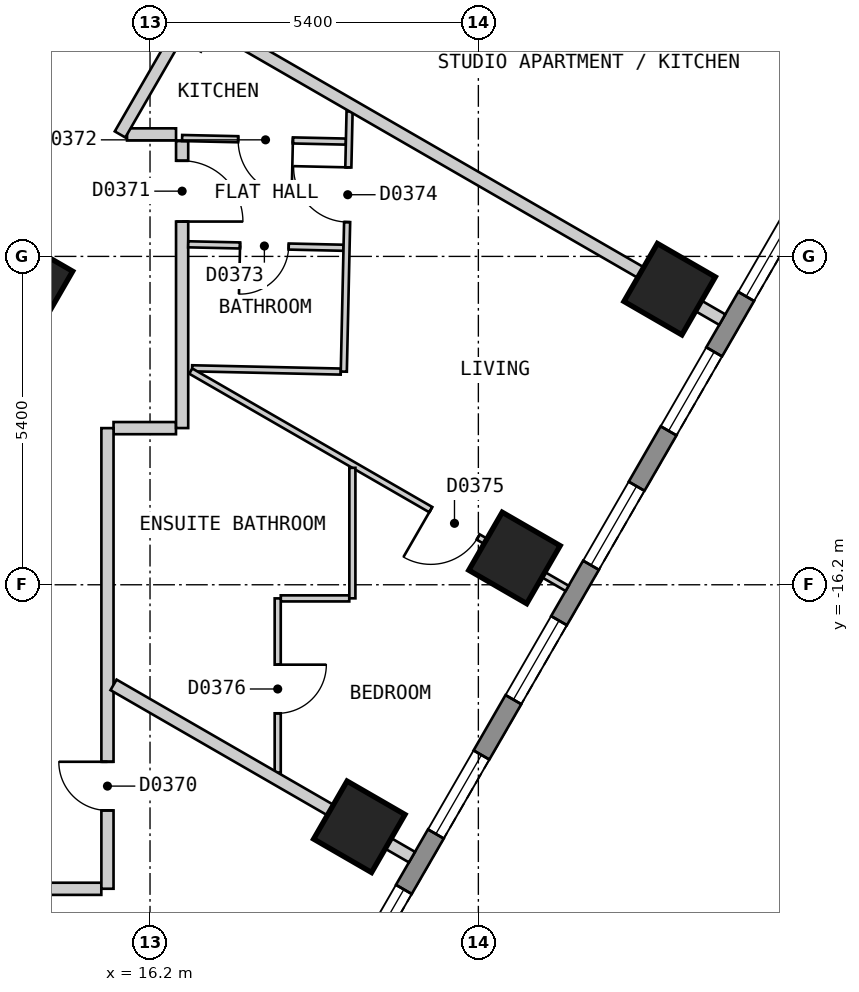
"""IFC4 building model, lengths in metres.
Left out: names, types, materials, properties, quantities, classifications, styles, units other than length and angle.
Written with IfcOpenShell. Run it as: python <this file> out.ifc"""

import sys

from ifc_helpers import new_model, si_unit, direction, frame, frame_2d, origin, origin_2d, place, context, subcontext, project, spatial, polyline, rectangle, outline, extrude, element, fill, save


model = new_model("IFC4")
c1 = context("Model", 3, precision=1e-05, world=origin(), true_north=direction((0.0, 1.0)))
c2 = subcontext(c1, "Body", "Model", "MODEL_VIEW")
j1 = project(units=[si_unit("LENGTHUNIT", "METRE"), si_unit("PLANEANGLEUNIT", "RADIAN")], contexts=[c1])
p1 = place(None, origin())
s1 = spatial("IfcSite", under=j1, at=p1, CompositionType="ELEMENT")
p2 = place(p1, origin())
s2 = spatial("IfcBuilding", under=s1, at=p2, CompositionType="ELEMENT")
p3 = place(p2, frame((0.0, 0.0, 59.4)))
s3 = spatial("IfcBuildingStorey", under=s2, at=p3, CompositionType="ELEMENT", Elevation=59.4)
for number, where, z_axis, x_axis in (
    (1, (19.642, -20.18, 0.0), (0.0, 0.0, 1.0), (0.5, 0.866, 0.0)),
    (2, (22.194, -15.759, 0.0), (0.0, 0.0, 1.0), (0.5, 0.866, 0.0)),
    (3, (24.746, -11.339, 0.0), (0.0, 0.0, 1.0), (0.5, 0.866, 0.0)),
    (4, (27.298, -6.919, 0.0), (0.0, 0.0, 1.0), (0.5, 0.866, 0.0)),
):
    element("IfcColumn", number, at=place(p3, frame(where, z_axis=z_axis, x_axis=x_axis)), inside=s3, PredefinedType="COLUMN", context=c2, shape_type="SweptSolid", body=[
        extrude(rectangle(XDim=1.1, YDim=1.1, at=origin_2d()), origin(), (0.0, 0.0, 1.0), 3.0),
    ])
p4 = place(p3, frame((14.313, -11.209, 0.0), z_axis=(0.0, 0.0, 1.0), x_axis=(0.499984884929, 0.866034130299, 0.0)))
e5 = element("IfcColumn", 5, at=p4, inside=s3, PredefinedType="COLUMN", context=c2, shape_type="SweptSolid", body=[
    extrude(rectangle(XDim=0.9, YDim=0.9, at=origin_2d()), origin(), (0.0, 0.0, 1.0), 3.0),
])
p5 = place(p3, frame((17.71, -25.825, 0.0), z_axis=(0.0, 0.0, 1.0), x_axis=(0.500001938803, 0.866024284413, 0.0)))
e6 = element("IfcWall", 6, at=p5, inside=s3, PredefinedType="SOLIDWALL", context=c2, shape_type="SweptSolid", body=[
    extrude(outline(polyline([(0.0, -0.15), (27.02, -0.15), (26.94, 0.15), (0.08, 0.15), (0.0, -0.15)])), origin(), (0.0, 0.0, 1.0), 2.6),
])
p6 = place(p5, frame((1.277, 0.0, 0.15)))
e7 = element("IfcOpeningElement", 7, at=p6, cuts=e6, PredefinedType="OPENING", context=c2, shape_type="SweptSolid", body=[
    extrude(rectangle(XDim=1.5, YDim=2.1, at=frame_2d((0.75, 1.05))), frame((0.0, 0.16, 0.0), z_axis=(0.0, -1.0, 0.0), x_axis=(1.0, 0.0, 0.0)), (0.0, 0.0, 1.0), 0.32),
])
p7 = place(p5, frame((3.829, 0.0, 0.15)))
e8 = element("IfcOpeningElement", 8, at=p7, cuts=e6, PredefinedType="OPENING", context=c2, shape_type="SweptSolid", body=[
    extrude(rectangle(XDim=1.5, YDim=2.1, at=frame_2d((0.75, 1.05))), frame((0.0, 0.16, 0.0), z_axis=(0.0, -1.0, 0.0), x_axis=(1.0, 0.0, 0.0)), (0.0, 0.0, 1.0), 0.32),
])
p8 = place(p5, frame((6.382, 0.0, 0.15)))
e9 = element("IfcOpeningElement", 9, at=p8, cuts=e6, PredefinedType="OPENING", context=c2, shape_type="SweptSolid", body=[
    extrude(rectangle(XDim=1.5, YDim=2.1, at=frame_2d((0.75, 1.05))), frame((0.0, 0.16, 0.0), z_axis=(0.0, -1.0, 0.0), x_axis=(1.0, 0.0, 0.0)), (0.0, 0.0, 1.0), 0.32),
])
p9 = place(p5, frame((8.933, 0.0, 0.15)))
e10 = element("IfcOpeningElement", 10, at=p9, cuts=e6, PredefinedType="OPENING", context=c2, shape_type="SweptSolid", body=[
    extrude(rectangle(XDim=1.5, YDim=2.1, at=frame_2d((0.75, 1.05))), frame((0.0, 0.16, 0.0), z_axis=(0.0, -1.0, 0.0), x_axis=(1.0, 0.0, 0.0)), (0.0, 0.0, 1.0), 0.32),
])
p10 = place(p5, frame((11.485, 0.0, 0.15)))
e11 = element("IfcOpeningElement", 11, at=p10, cuts=e6, PredefinedType="OPENING", context=c2, shape_type="SweptSolid", body=[
    extrude(rectangle(XDim=1.5, YDim=2.1, at=frame_2d((0.75, 1.05))), frame((0.0, 0.16, 0.0), z_axis=(0.0, -1.0, 0.0), x_axis=(1.0, 0.0, 0.0)), (0.0, 0.0, 1.0), 0.32),
])
p11 = place(p5, frame((14.037, 0.0, 0.15)))
e12 = element("IfcOpeningElement", 12, at=p11, cuts=e6, PredefinedType="OPENING", context=c2, shape_type="SweptSolid", body=[
    extrude(rectangle(XDim=1.5, YDim=2.1, at=frame_2d((0.75, 1.05))), frame((0.0, 0.16, 0.0), z_axis=(0.0, -1.0, 0.0), x_axis=(1.0, 0.0, 0.0)), (0.0, 0.0, 1.0), 0.32),
])
p12 = place(p5, frame((16.589, 0.0, 0.15)))
e13 = element("IfcOpeningElement", 13, at=p12, cuts=e6, PredefinedType="OPENING", context=c2, shape_type="SweptSolid", body=[
    extrude(rectangle(XDim=1.5, YDim=2.1, at=frame_2d((0.75, 1.05))), frame((0.0, 0.16, 0.0), z_axis=(0.0, -1.0, 0.0), x_axis=(1.0, 0.0, 0.0)), (0.0, 0.0, 1.0), 0.32),
])
p13 = place(p5, frame((19.141, 0.0, 0.15)))
e14 = element("IfcOpeningElement", 14, at=p13, cuts=e6, PredefinedType="OPENING", context=c2, shape_type="SweptSolid", body=[
    extrude(rectangle(XDim=1.5, YDim=2.1, at=frame_2d((0.75, 1.05))), frame((0.0, 0.16, 0.0), z_axis=(0.0, -1.0, 0.0), x_axis=(1.0, 0.0, 0.0)), (0.0, 0.0, 1.0), 0.32),
])
p14 = place(p5, frame((21.693, 0.0, 0.15)))
e15 = element("IfcOpeningElement", 15, at=p14, cuts=e6, PredefinedType="OPENING", context=c2, shape_type="SweptSolid", body=[
    extrude(rectangle(XDim=1.5, YDim=2.1, at=frame_2d((0.75, 1.05))), frame((0.0, 0.16, 0.0), z_axis=(0.0, -1.0, 0.0), x_axis=(1.0, 0.0, 0.0)), (0.0, 0.0, 1.0), 0.32),
])
p15 = place(p5, frame((24.244, 0.0, 0.15)))
e16 = element("IfcOpeningElement", 16, at=p15, cuts=e6, PredefinedType="OPENING", context=c2, shape_type="SweptSolid", body=[
    extrude(rectangle(XDim=1.5, YDim=2.1, at=frame_2d((0.75, 1.05))), frame((0.0, 0.16, 0.0), z_axis=(0.0, -1.0, 0.0), x_axis=(1.0, 0.0, 0.0)), (0.0, 0.0, 1.0), 0.32),
])
p16 = place(p3, frame((15.822, -8.794, 0.0), z_axis=(0.0, 0.0, 1.0), x_axis=(1.0, 0.0, 0.0)))
e17 = element("IfcWall", 17, at=p16, inside=s3, PredefinedType="PARTITIONING", context=c2, shape_type="SweptSolid", body=[
    extrude(rectangle(XDim=0.806, YDim=0.2, at=frame_2d((0.403, 0.0))), origin(), (0.0, 0.0, 1.0), 2.6),
])
p17 = place(p3, frame((15.6, -13.624, 0.0), z_axis=(0.0, 0.0, 1.0), x_axis=(1.0, 0.0, 0.0)))
e18 = element("IfcWall", 18, at=p17, inside=s3, PredefinedType="PARTITIONING", context=c2, shape_type="SweptSolid", body=[
    extrude(rectangle(XDim=1.027, YDim=0.2, at=frame_2d((0.513, 0.0))), origin(), (0.0, 0.0, 1.0), 2.6),
])
p18 = place(p3, frame((-15.4, -21.2, 0.0), z_axis=(0.0, 0.0, 1.0), x_axis=(1.0, 0.0, 0.0)))
e19 = element("IfcWall", 19, at=p18, inside=s3, PredefinedType="PARTITIONING", context=c2, shape_type="SweptSolid", body=[
    extrude(rectangle(XDim=30.799, YDim=0.2, at=frame_2d((15.399, 0.0))), origin(), (0.0, 0.0, 1.0), 2.6),
])
p19 = place(p18, frame((9.797, 0.0, 0.0)))
e20 = element("IfcOpeningElement", 20, at=p19, cuts=e19, PredefinedType="OPENING", context=c2, shape_type="SweptSolid", body=[
    extrude(rectangle(XDim=1.0, YDim=2.1, at=frame_2d((0.5, 1.05))), frame((0.0, 0.11, 0.0), z_axis=(0.0, -1.0, 0.0), x_axis=(1.0, 0.0, 0.0)), (0.0, 0.0, 1.0), 0.22),
])
p20 = place(p18, frame((14.901, 0.0, 0.0)))
e21 = element("IfcOpeningElement", 21, at=p20, cuts=e19, PredefinedType="OPENING", context=c2, shape_type="SweptSolid", body=[
    extrude(rectangle(XDim=1.0, YDim=2.1, at=frame_2d((0.5, 1.05))), frame((0.0, 0.11, 0.0), z_axis=(0.0, -1.0, 0.0), x_axis=(1.0, 0.0, 0.0)), (0.0, 0.0, 1.0), 0.22),
])
p21 = place(p18, frame((24.916, 0.0, 0.0)))
e22 = element("IfcOpeningElement", 22, at=p21, cuts=e19, PredefinedType="OPENING", context=c2, shape_type="SweptSolid", body=[
    extrude(rectangle(XDim=0.9, YDim=2.1, at=frame_2d((0.45, 1.05))), frame((0.0, 0.11, 0.0), z_axis=(0.0, -1.0, 0.0), x_axis=(1.0, 0.0, 0.0)), (0.0, 0.0, 1.0), 0.22),
])
p22 = place(p3, frame((15.707, -8.794, 0.0), z_axis=(0.0, 0.0, 1.0), x_axis=(0.500040469623, 0.866002037376, 0.0)))
e23 = element("IfcWall", 23, at=p22, inside=s3, PredefinedType="PARTITIONING", context=c2, shape_type="SweptSolid", body=[
    extrude(rectangle(XDim=2.281, YDim=0.2, at=frame_2d((1.141, 0.0))), origin(), (0.0, 0.0, 1.0), 2.6),
])
p23 = place(p3, frame((15.5, -21.199, 0.0), z_axis=(0.0, 0.0, 1.0), x_axis=(0.0, 1.0, 0.0)))
e24 = element("IfcWall", 24, at=p23, inside=s3, PredefinedType="PARTITIONING", context=c2, shape_type="SweptSolid", body=[
    extrude(rectangle(XDim=7.575, YDim=0.2, at=frame_2d((3.788, 0.0))), origin(), (0.0, 0.0, 1.0), 2.6),
])
p24 = place(p23, frame((1.288, 0.0, 0.0)))
e25 = element("IfcOpeningElement", 25, at=p24, cuts=e24, PredefinedType="OPENING", context=c2, shape_type="SweptSolid", body=[
    extrude(rectangle(XDim=0.8, YDim=2.1, at=frame_2d((0.4, 1.05))), frame((0.0, 0.11, 0.0), z_axis=(0.0, -1.0, 0.0), x_axis=(1.0, 0.0, 0.0)), (0.0, 0.0, 1.0), 0.22),
])
p25 = place(p3, frame((16.728, -13.623, 0.0), z_axis=(0.0, 0.0, 1.0), x_axis=(0.0, 1.0, 0.0)))
e26 = element("IfcWall", 26, at=p25, inside=s3, PredefinedType="PARTITIONING", context=c2, shape_type="SweptSolid", body=[
    extrude(rectangle(XDim=4.72, YDim=0.2, at=frame_2d((2.36, 0.0))), origin(), (0.0, 0.0, 1.0), 2.6),
])
p26 = place(p25, frame((3.396, 0.0, 0.0)))
e27 = element("IfcOpeningElement", 27, at=p26, cuts=e26, PredefinedType="OPENING", context=c2, shape_type="SweptSolid", body=[
    extrude(rectangle(XDim=1.0, YDim=2.1, at=frame_2d((0.5, 1.05))), frame((0.0, 0.11, 0.0), z_axis=(0.0, -1.0, 0.0), x_axis=(1.0, 0.0, 0.0)), (0.0, 0.0, 1.0), 0.22),
])
p27 = place(p3, frame((16.728, -8.853, 0.0), z_axis=(0.0, 0.0, 1.0), x_axis=(0.999759401479, -0.02193488442, 0.0)))
e28 = element("IfcWall", 28, at=p27, inside=s3, PredefinedType="PARTITIONING", context=c2, shape_type="SweptSolid", body=[
    extrude(rectangle(XDim=2.694, YDim=0.1, at=frame_2d((1.347, 0.0))), origin(), (0.0, 0.0, 1.0), 2.6),
])
p28 = place(p27, frame((0.922, 0.0, 0.0)))
e29 = element("IfcOpeningElement", 29, at=p28, cuts=e28, PredefinedType="OPENING", context=c2, shape_type="SweptSolid", body=[
    extrude(rectangle(XDim=0.9, YDim=2.1, at=frame_2d((0.45, 1.05))), frame((0.0, 0.06, 0.0), z_axis=(0.0, -1.0, 0.0), x_axis=(1.0, 0.0, 0.0)), (0.0, 0.0, 1.0), 0.12),
])
p29 = place(p3, frame((16.828, -10.601, 0.0), z_axis=(0.0, 0.0, 1.0), x_axis=(0.999752091799, -0.022265555094, 0.0)))
e30 = element("IfcWall", 30, at=p29, inside=s3, PredefinedType="PARTITIONING", context=c2, shape_type="SweptSolid", body=[
    extrude(rectangle(XDim=2.555, YDim=0.1, at=frame_2d((1.277, 0.0))), origin(), (0.0, 0.0, 1.0), 2.6),
])
p30 = place(p29, frame((0.853, 0.0, 0.0)))
e31 = element("IfcOpeningElement", 31, at=p30, cuts=e30, PredefinedType="OPENING", context=c2, shape_type="SweptSolid", body=[
    extrude(rectangle(XDim=0.8, YDim=2.1, at=frame_2d((0.4, 1.05))), frame((0.0, 0.06, 0.0), z_axis=(0.0, -1.0, 0.0), x_axis=(1.0, 0.0, 0.0)), (0.0, 0.0, 1.0), 0.12),
])
p31 = place(p3, frame((16.892, -12.64, 0.0), z_axis=(0.0, 0.0, 1.0), x_axis=(0.999754359069, -0.022163517846, 0.0)))
e32 = element("IfcWall", 32, at=p31, inside=s3, PredefinedType="PARTITIONING", context=c2, shape_type="SweptSolid", body=[
    extrude(rectangle(XDim=2.445, YDim=0.1, at=frame_2d((1.223, 0.0))), origin(), (0.0, 0.0, 1.0), 2.6),
])
p32 = place(p3, frame((16.87, -12.686, 0.0), z_axis=(0.0, 0.0, 1.0), x_axis=(0.866071826058, -0.499919585642, 0.0)))
e33 = element("IfcWall", 33, at=p32, inside=s3, PredefinedType="PARTITIONING", context=c2, shape_type="SweptSolid", body=[
    extrude(rectangle(XDim=7.147, YDim=0.1, at=frame_2d((3.574, 0.0))), origin(), (0.0, 0.0, 1.0), 2.6),
])
p33 = place(p32, frame((4.558, 0.0, 0.0)))
e34 = element("IfcOpeningElement", 34, at=p33, cuts=e33, PredefinedType="OPENING", context=c2, shape_type="SweptSolid", body=[
    extrude(rectangle(XDim=0.9, YDim=2.1, at=frame_2d((0.45, 1.05))), frame((0.0, 0.06, 0.0), z_axis=(0.0, -1.0, 0.0), x_axis=(1.0, 0.0, 0.0)), (0.0, 0.0, 1.0), 0.12),
])
p34 = place(p3, frame((18.35, -16.424, 0.0), z_axis=(0.0, 0.0, 1.0), x_axis=(1.0, 0.0, 0.0)))
e35 = element("IfcWall", 35, at=p34, inside=s3, PredefinedType="PARTITIONING", context=c2, shape_type="SweptSolid", body=[
    extrude(rectangle(XDim=1.127, YDim=0.1, at=frame_2d((0.563, 0.0))), origin(), (0.0, 0.0, 1.0), 2.6),
])
p35 = place(p3, frame((19.387, -12.695, 0.0), z_axis=(0.0, 0.0, 1.0), x_axis=(0.022188864436, 0.99975379684, 0.0)))
e36 = element("IfcWall", 36, at=p35, inside=s3, PredefinedType="PARTITIONING", context=c2, shape_type="SweptSolid", body=[
    extrude(rectangle(XDim=4.28, YDim=0.1, at=frame_2d((2.14, 0.0))), origin(), (0.0, 0.0, 1.0), 2.6),
])
p36 = place(p35, frame((2.46, 0.0, 0.0)))
e37 = element("IfcOpeningElement", 37, at=p36, cuts=e36, PredefinedType="OPENING", context=c2, shape_type="SweptSolid", body=[
    extrude(rectangle(XDim=0.9, YDim=2.1, at=frame_2d((0.45, 1.05))), frame((0.0, 0.06, 0.0), z_axis=(0.0, -1.0, 0.0), x_axis=(1.0, 0.0, 0.0)), (0.0, 0.0, 1.0), 0.12),
])
p37 = place(p3, frame((18.3, -19.289, 0.0), z_axis=(0.0, 0.0, 1.0), x_axis=(0.0, 1.0, 0.0)))
e38 = element("IfcWall", 38, at=p37, inside=s3, PredefinedType="PARTITIONING", context=c2, shape_type="SweptSolid", body=[
    extrude(rectangle(XDim=2.865, YDim=0.1, at=frame_2d((1.433, 0.0))), origin(), (0.0, 0.0, 1.0), 2.6),
])
p38 = place(p37, frame((0.975, 0.0, 0.0)))
e39 = element("IfcOpeningElement", 39, at=p38, cuts=e38, PredefinedType="OPENING", context=c2, shape_type="SweptSolid", body=[
    extrude(rectangle(XDim=0.8, YDim=2.1, at=frame_2d((0.4, 1.05))), frame((0.0, 0.06, 0.0), z_axis=(0.0, -1.0, 0.0), x_axis=(1.0, 0.0, 0.0)), (0.0, 0.0, 1.0), 0.12),
])
p39 = place(p3, frame((19.528, -16.423, 0.0), z_axis=(0.0, 0.0, 1.0), x_axis=(0.0, 1.0, 0.0)))
e40 = element("IfcWall", 40, at=p39, inside=s3, PredefinedType="PARTITIONING", context=c2, shape_type="SweptSolid", body=[
    extrude(rectangle(XDim=2.146, YDim=0.1, at=frame_2d((1.073, 0.0))), origin(), (0.0, 0.0, 1.0), 2.6),
])
p40 = place(p3, frame((12.274, -21.26, 0.0), z_axis=(0.0, 0.0, 1.0), x_axis=(0.500064857354, -0.865987955135, 0.0)))
e41 = element("IfcWall", 41, at=p40, inside=s3, PredefinedType="PARTITIONING", context=c2, shape_type="SweptSolid", body=[
    extrude(rectangle(XDim=6.501, YDim=0.2, at=frame_2d((3.25, 0.0))), origin(), (0.0, 0.0, 1.0), 2.6),
])
p41 = place(p3, frame((15.6, -17.846, 0.0), z_axis=(0.0, 0.0, 1.0), x_axis=(0.866071523686, -0.499920109479, 0.0)))
e42 = element("IfcWall", 42, at=p41, inside=s3, PredefinedType="PARTITIONING", context=c2, shape_type="SweptSolid", body=[
    extrude(rectangle(XDim=5.667, YDim=0.2, at=frame_2d((2.833, 0.0))), origin(), (0.0, 0.0, 1.0), 2.6),
])
p42 = place(p3, frame((19.503, -2.419, 0.0), z_axis=(0.0, 0.0, 1.0), x_axis=(0.866047370643, -0.499961950354, 0.0)))
e43 = element("IfcWall", 43, at=p42, inside=s3, PredefinedType="PARTITIONING", context=c2, shape_type="SweptSolid", body=[
    extrude(rectangle(XDim=10.001, YDim=0.2, at=frame_2d((5.0, 0.0))), origin(), (0.0, 0.0, 1.0), 2.6),
])
p43 = place(p3, frame((16.916, -6.819, 0.0), z_axis=(0.0, 0.0, 1.0), x_axis=(0.866028876723, -0.499993984646, 0.0)))
e44 = element("IfcWall", 44, at=p43, inside=s3, PredefinedType="PARTITIONING", context=c2, shape_type="SweptSolid", body=[
    extrude(rectangle(XDim=10.04, YDim=0.2, at=frame_2d((5.02, 0.0))), origin(), (0.0, 0.0, 1.0), 2.6),
])
p44 = place(p7, origin())
e45 = element("IfcWindow", 45, at=p44, inside=s3, PartitioningType="SINGLE_PANEL", PredefinedType="WINDOW", context=c2, shape_type="SweptSolid", body=[
    extrude(rectangle(XDim=1.5, YDim=2.1, at=frame_2d((0.75, 1.05))), frame((0.0, 0.03, 0.0), z_axis=(0.0, -1.0, 0.0), x_axis=(1.0, 0.0, 0.0)), (0.0, 0.0, 1.0), 0.06),
])
fill(e8, e45)
p45 = place(p8, origin())
e46 = element("IfcWindow", 46, at=p45, inside=s3, PartitioningType="SINGLE_PANEL", PredefinedType="WINDOW", context=c2, shape_type="SweptSolid", body=[
    extrude(rectangle(XDim=1.5, YDim=2.1, at=frame_2d((0.75, 1.05))), frame((0.0, 0.03, 0.0), z_axis=(0.0, -1.0, 0.0), x_axis=(1.0, 0.0, 0.0)), (0.0, 0.0, 1.0), 0.06),
])
fill(e9, e46)
p46 = place(p9, origin())
e47 = element("IfcWindow", 47, at=p46, inside=s3, PartitioningType="SINGLE_PANEL", PredefinedType="WINDOW", context=c2, shape_type="SweptSolid", body=[
    extrude(rectangle(XDim=1.5, YDim=2.1, at=frame_2d((0.75, 1.05))), frame((0.0, 0.03, 0.0), z_axis=(0.0, -1.0, 0.0), x_axis=(1.0, 0.0, 0.0)), (0.0, 0.0, 1.0), 0.06),
])
fill(e10, e47)
p47 = place(p10, origin())
e48 = element("IfcWindow", 48, at=p47, inside=s3, PartitioningType="SINGLE_PANEL", PredefinedType="WINDOW", context=c2, shape_type="SweptSolid", body=[
    extrude(rectangle(XDim=1.5, YDim=2.1, at=frame_2d((0.75, 1.05))), frame((0.0, 0.03, 0.0), z_axis=(0.0, -1.0, 0.0), x_axis=(1.0, 0.0, 0.0)), (0.0, 0.0, 1.0), 0.06),
])
fill(e11, e48)
p48 = place(p11, origin())
e49 = element("IfcWindow", 49, at=p48, inside=s3, PartitioningType="SINGLE_PANEL", PredefinedType="WINDOW", context=c2, shape_type="SweptSolid", body=[
    extrude(rectangle(XDim=1.5, YDim=2.1, at=frame_2d((0.75, 1.05))), frame((0.0, 0.03, 0.0), z_axis=(0.0, -1.0, 0.0), x_axis=(1.0, 0.0, 0.0)), (0.0, 0.0, 1.0), 0.06),
])
fill(e12, e49)
p49 = place(p12, origin())
e50 = element("IfcWindow", 50, at=p49, inside=s3, PartitioningType="SINGLE_PANEL", PredefinedType="WINDOW", context=c2, shape_type="SweptSolid", body=[
    extrude(rectangle(XDim=1.5, YDim=2.1, at=frame_2d((0.75, 1.05))), frame((0.0, 0.03, 0.0), z_axis=(0.0, -1.0, 0.0), x_axis=(1.0, 0.0, 0.0)), (0.0, 0.0, 1.0), 0.06),
])
fill(e13, e50)
p50 = place(p24, origin())
e51 = element("IfcDoor", 51, at=p50, inside=s3, OperationType="SINGLE_SWING_RIGHT", PredefinedType="DOOR", context=c2, shape_type="SweptSolid", body=[
    extrude(rectangle(XDim=0.8, YDim=2.1, at=frame_2d((0.4, 1.05))), frame((0.0, 0.025, 0.0), z_axis=(0.0, -1.0, 0.0), x_axis=(1.0, 0.0, 0.0)), (0.0, 0.0, 1.0), 0.05),
])
fill(e25, e51)
p51 = place(p26, origin())
e52 = element("IfcDoor", 52, at=p51, inside=s3, OperationType="SINGLE_SWING_LEFT", PredefinedType="DOOR", context=c2, shape_type="SweptSolid", body=[
    extrude(rectangle(XDim=1.0, YDim=2.1, at=frame_2d((0.5, 1.05))), frame((0.0, 0.025, 0.0), z_axis=(0.0, -1.0, 0.0), x_axis=(1.0, 0.0, 0.0)), (0.0, 0.0, 1.0), 0.05),
])
fill(e27, e52)
p52 = place(p28, origin())
e53 = element("IfcDoor", 53, at=p52, inside=s3, OperationType="SINGLE_SWING_RIGHT", PredefinedType="DOOR", context=c2, shape_type="SweptSolid", body=[
    extrude(rectangle(XDim=0.9, YDim=2.1, at=frame_2d((0.45, 1.05))), frame((0.0, 0.025, 0.0), z_axis=(0.0, -1.0, 0.0), x_axis=(1.0, 0.0, 0.0)), (0.0, 0.0, 1.0), 0.05),
])
fill(e29, e53)
p53 = place(p30, origin())
e54 = element("IfcDoor", 54, at=p53, inside=s3, OperationType="SINGLE_SWING_LEFT", PredefinedType="DOOR", context=c2, shape_type="SweptSolid", body=[
    extrude(rectangle(XDim=0.8, YDim=2.1, at=frame_2d((0.4, 1.05))), frame((0.0, 0.025, 0.0), z_axis=(0.0, -1.0, 0.0), x_axis=(1.0, 0.0, 0.0)), (0.0, 0.0, 1.0), 0.05),
])
fill(e31, e54)
p54 = place(p36, origin())
e55 = element("IfcDoor", 55, at=p54, inside=s3, OperationType="SINGLE_SWING_RIGHT", PredefinedType="DOOR", context=c2, shape_type="SweptSolid", body=[
    extrude(rectangle(XDim=0.9, YDim=2.1, at=frame_2d((0.45, 1.05))), frame((0.0, 0.025, 0.0), z_axis=(0.0, -1.0, 0.0), x_axis=(1.0, 0.0, 0.0)), (0.0, 0.0, 1.0), 0.05),
])
fill(e37, e55)
p55 = place(p33, origin())
e56 = element("IfcDoor", 56, at=p55, inside=s3, OperationType="SINGLE_SWING_LEFT", PredefinedType="DOOR", context=c2, shape_type="SweptSolid", body=[
    extrude(rectangle(XDim=0.9, YDim=2.1, at=frame_2d((0.45, 1.05))), frame((0.0, 0.025, 0.0), z_axis=(0.0, -1.0, 0.0), x_axis=(1.0, 0.0, 0.0)), (0.0, 0.0, 1.0), 0.05),
])
fill(e34, e56)
p56 = place(p38, origin())
e57 = element("IfcDoor", 57, at=p56, inside=s3, OperationType="SINGLE_SWING_RIGHT", PredefinedType="DOOR", context=c2, shape_type="SweptSolid", body=[
    extrude(rectangle(XDim=0.8, YDim=2.1, at=frame_2d((0.4, 1.05))), frame((0.0, 0.025, 0.0), z_axis=(0.0, -1.0, 0.0), x_axis=(1.0, 0.0, 0.0)), (0.0, 0.0, 1.0), 0.05),
])
fill(e39, e57)
save(model, sys.argv[1])
